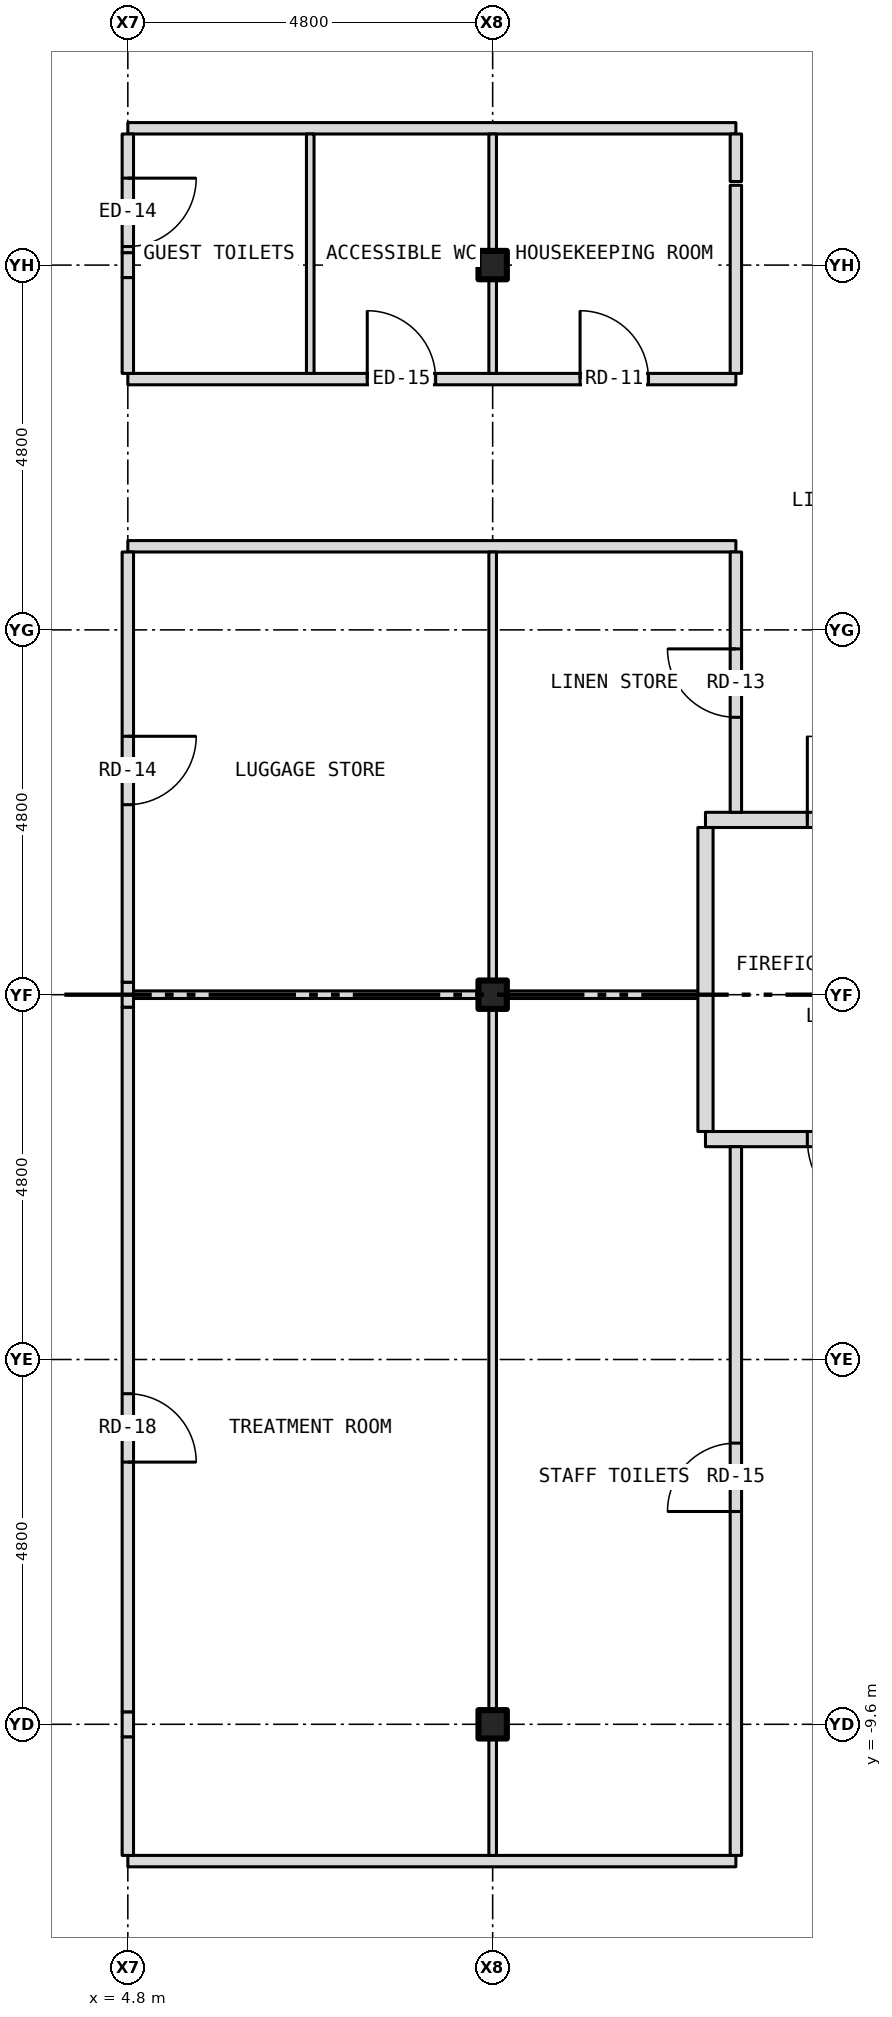
"""IFC4 building model, lengths in metres.
Left out: names, types, materials, properties, quantities, classifications, styles, units other than length and angle.
Written with IfcOpenShell. Run it as: python <this file> out.ifc"""

import sys

from ifc_helpers import new_model, si_unit, direction, frame, frame_2d, origin, origin_2d, place, context, subcontext, project, spatial, rectangle, i_section, extrude, element, fill, save


model = new_model("IFC4")
c1 = context("Model", 3, precision=1e-05, world=origin(), true_north=direction((0.0, 1.0)))
c2 = subcontext(c1, "Body", "Model", "MODEL_VIEW")
j1 = project(units=[si_unit("LENGTHUNIT", "METRE"), si_unit("PLANEANGLEUNIT", "RADIAN")], contexts=[c1])
p1 = place(None, origin())
s1 = spatial("IfcSite", under=j1, at=p1, CompositionType="ELEMENT")
p2 = place(p1, origin())
s2 = spatial("IfcBuilding", under=s1, at=p2, CompositionType="ELEMENT")
p3 = place(p2, frame((0.0, 0.0, 158.5)))
s3 = spatial("IfcBuildingStorey", under=s2, at=p3, CompositionType="ELEMENT", Elevation=158.5)
for number, where, z_axis, x_axis in (
    (1, (9.6, -9.6, -0.15), (0.0, 0.0, 1.0), (1.0, 0.0, 0.0)),
    (2, (9.6, 0.0, -0.15), (0.0, 0.0, 1.0), (1.0, 0.0, 0.0)),
    (3, (9.6, 9.6, -0.15), (0.0, 0.0, 1.0), (1.0, 0.0, 0.0)),
):
    element("IfcColumn", number, at=place(p3, frame(where, z_axis=z_axis, x_axis=x_axis)), inside=s3, PredefinedType="COLUMN", context=c2, shape_type="SweptSolid", body=[
        extrude(i_section(OverallWidth=0.373, OverallDepth=0.373, WebThickness=0.016, FlangeThickness=0.026, at=origin_2d()), origin(), (0.0, 0.0, 1.0), 3.5),
    ])
p4 = place(p3, frame((4.8, -11.4, 0.0), z_axis=(0.0, 0.0, 1.0), x_axis=(1.0, 0.0, 0.0)))
e4 = element("IfcWall", 4, at=p4, inside=s3, PredefinedType="PARTITIONING", context=c2, shape_type="SweptSolid", body=[
    extrude(rectangle(XDim=8.0, YDim=0.15, at=frame_2d((4.0, 0.0))), origin(), (0.0, 0.0, 1.0), 3.35),
])
p5 = place(p3, frame((12.4, -1.9, 0.0), z_axis=(0.0, 0.0, 1.0), x_axis=(1.0, 0.0, 0.0)))
e5 = element("IfcWall", 5, at=p5, inside=s3, PredefinedType="PARTITIONING", context=c2, shape_type="SweptSolid", body=[
    extrude(rectangle(XDim=3.28, YDim=0.2, at=frame_2d((1.64, 0.0))), origin(), (0.0, 0.0, 1.0), 3.35),
])
p6 = place(p5, frame((1.34, 0.0, 0.0)))
e6 = element("IfcOpeningElement", 6, at=p6, cuts=e5, PredefinedType="OPENING", context=c2, shape_type="SweptSolid", body=[
    extrude(rectangle(XDim=1.1, YDim=2.1, at=frame_2d((0.55, 1.05))), frame((0.0, 0.112, 0.0), z_axis=(0.0, -1.0, 0.0), x_axis=(1.0, 0.0, 0.0)), (0.0, 0.0, 1.0), 0.224),
])
p7 = place(p3, frame((4.8, 0.0, 0.0), z_axis=(0.0, 0.0, 1.0), x_axis=(1.0, 0.0, 0.0)))
e7 = element("IfcWall", 7, at=p7, inside=s3, PredefinedType="PARTITIONING", context=c2, shape_type="SweptSolid", body=[
    extrude(rectangle(XDim=4.613, YDim=0.1, at=frame_2d((2.307, 0.0))), origin(), (0.0, 0.0, 1.0), 2.728),
])
p8 = place(p3, frame((9.413, 0.0, 0.0), z_axis=(0.0, 0.0, 1.0), x_axis=(1.0, 0.0, 0.0)))
e8 = element("IfcWall", 8, at=p8, inside=s3, PredefinedType="PARTITIONING", context=c2, shape_type="SweptSolid", body=[
    extrude(rectangle(XDim=0.374, YDim=0.1, at=frame_2d((0.187, 0.0))), origin(), (0.0, 0.0, 1.0), 3.35),
])
p9 = place(p3, frame((9.787, 0.0, 0.0), z_axis=(0.0, 0.0, 1.0), x_axis=(1.0, 0.0, 0.0)))
e9 = element("IfcWall", 9, at=p9, inside=s3, PredefinedType="PARTITIONING", context=c2, shape_type="SweptSolid", body=[
    extrude(rectangle(XDim=2.613, YDim=0.1, at=frame_2d((1.306, 0.0))), origin(), (0.0, 0.0, 1.0), 2.728),
])
p10 = place(p3, frame((12.4, 2.3, 0.0), z_axis=(0.0, 0.0, 1.0), x_axis=(1.0, 0.0, 0.0)))
e10 = element("IfcWall", 10, at=p10, inside=s3, PredefinedType="PARTITIONING", context=c2, shape_type="SweptSolid", body=[
    extrude(rectangle(XDim=3.28, YDim=0.2, at=frame_2d((1.64, 0.0))), origin(), (0.0, 0.0, 1.0), 3.35),
])
p11 = place(p10, frame((1.34, 0.0, 0.0)))
e11 = element("IfcOpeningElement", 11, at=p11, cuts=e10, PredefinedType="OPENING", context=c2, shape_type="SweptSolid", body=[
    extrude(rectangle(XDim=1.1, YDim=2.1, at=frame_2d((0.55, 1.05))), frame((0.0, 0.112, 0.0), z_axis=(0.0, -1.0, 0.0), x_axis=(1.0, 0.0, 0.0)), (0.0, 0.0, 1.0), 0.224),
])
p12 = place(p3, frame((4.8, 5.9, 0.0), z_axis=(0.0, 0.0, 1.0), x_axis=(1.0, 0.0, 0.0)))
e12 = element("IfcWall", 12, at=p12, inside=s3, PredefinedType="PARTITIONING", context=c2, shape_type="SweptSolid", body=[
    extrude(rectangle(XDim=8.0, YDim=0.15, at=frame_2d((4.0, 0.0))), origin(), (0.0, 0.0, 1.0), 3.35),
])
p13 = place(p3, frame((4.8, 8.1, 0.0), z_axis=(0.0, 0.0, 1.0), x_axis=(1.0, 0.0, 0.0)))
e13 = element("IfcWall", 13, at=p13, inside=s3, PredefinedType="PARTITIONING", context=c2, shape_type="SweptSolid", body=[
    extrude(rectangle(XDim=8.0, YDim=0.15, at=frame_2d((4.0, 0.0))), origin(), (0.0, 0.0, 1.0), 3.35),
])
p14 = place(p13, frame((5.95, 0.0, 0.0)))
e14 = element("IfcOpeningElement", 14, at=p14, cuts=e13, PredefinedType="OPENING", context=c2, shape_type="SweptSolid", body=[
    extrude(rectangle(XDim=0.9, YDim=2.1, at=frame_2d((0.45, 1.05))), frame((0.0, 0.087, 0.0), z_axis=(0.0, -1.0, 0.0), x_axis=(1.0, 0.0, 0.0)), (0.0, 0.0, 1.0), 0.174),
])
p15 = place(p13, frame((3.15, 0.0, 0.0)))
e15 = element("IfcOpeningElement", 15, at=p15, cuts=e13, PredefinedType="OPENING", context=c2, shape_type="SweptSolid", body=[
    extrude(rectangle(XDim=0.9, YDim=2.1, at=frame_2d((0.45, 1.05))), frame((0.0, 0.087, 0.0), z_axis=(0.0, -1.0, 0.0), x_axis=(1.0, 0.0, 0.0)), (0.0, 0.0, 1.0), 0.174),
])
p16 = place(p3, frame((4.8, 11.4, 0.0), z_axis=(0.0, 0.0, 1.0), x_axis=(1.0, 0.0, 0.0)))
e16 = element("IfcWall", 16, at=p16, inside=s3, PredefinedType="PARTITIONING", context=c2, shape_type="SweptSolid", body=[
    extrude(rectangle(XDim=8.0, YDim=0.15, at=frame_2d((4.0, 0.0))), origin(), (0.0, 0.0, 1.0), 3.35),
])
p17 = place(p3, frame((4.8, -11.325, 0.0), z_axis=(0.0, 0.0, 1.0), x_axis=(0.0, 1.0, 0.0)))
e17 = element("IfcWall", 17, at=p17, inside=s3, PredefinedType="PARTITIONING", context=c2, shape_type="SweptSolid", body=[
    extrude(rectangle(XDim=1.561, YDim=0.15, at=frame_2d((0.781, 0.0))), origin(), (0.0, 0.0, 1.0), 2.817),
])
p18 = place(p3, frame((4.8, -9.764, 0.0), z_axis=(0.0, 0.0, 1.0), x_axis=(0.0, 1.0, 0.0)))
e18 = element("IfcWall", 18, at=p18, inside=s3, PredefinedType="PARTITIONING", context=c2, shape_type="SweptSolid", body=[
    extrude(rectangle(XDim=0.328, YDim=0.15, at=frame_2d((0.164, 0.0))), origin(), (0.0, 0.0, 1.0), 3.35),
])
p19 = place(p3, frame((4.8, -9.436, 0.0), z_axis=(0.0, 0.0, 1.0), x_axis=(0.0, 1.0, 0.0)))
e19 = element("IfcWall", 19, at=p19, inside=s3, PredefinedType="PARTITIONING", context=c2, shape_type="SweptSolid", body=[
    extrude(rectangle(XDim=9.272, YDim=0.15, at=frame_2d((4.636, 0.0))), origin(), (0.0, 0.0, 1.0), 2.817),
])
p20 = place(p19, frame((3.286, 0.0, 0.0)))
e20 = element("IfcOpeningElement", 20, at=p20, cuts=e19, PredefinedType="OPENING", context=c2, shape_type="SweptSolid", body=[
    extrude(rectangle(XDim=0.9, YDim=2.1, at=frame_2d((0.45, 1.05))), frame((0.0, 0.087, 0.0), z_axis=(0.0, -1.0, 0.0), x_axis=(1.0, 0.0, 0.0)), (0.0, 0.0, 1.0), 0.174),
])
p21 = place(p3, frame((4.8, -0.164, 0.0), z_axis=(0.0, 0.0, 1.0), x_axis=(0.0, 1.0, 0.0)))
e21 = element("IfcWall", 21, at=p21, inside=s3, PredefinedType="PARTITIONING", context=c2, shape_type="SweptSolid", body=[
    extrude(rectangle(XDim=0.328, YDim=0.15, at=frame_2d((0.164, 0.0))), origin(), (0.0, 0.0, 1.0), 3.35),
])
p22 = place(p3, frame((4.8, 0.164, 0.0), z_axis=(0.0, 0.0, 1.0), x_axis=(0.0, 1.0, 0.0)))
e22 = element("IfcWall", 22, at=p22, inside=s3, PredefinedType="PARTITIONING", context=c2, shape_type="SweptSolid", body=[
    extrude(rectangle(XDim=5.661, YDim=0.15, at=frame_2d((2.831, 0.0))), origin(), (0.0, 0.0, 1.0), 2.817),
])
p23 = place(p22, frame((2.336, 0.0, 0.0)))
e23 = element("IfcOpeningElement", 23, at=p23, cuts=e22, PredefinedType="OPENING", context=c2, shape_type="SweptSolid", body=[
    extrude(rectangle(XDim=0.9, YDim=2.1, at=frame_2d((0.45, 1.05))), frame((0.0, 0.087, 0.0), z_axis=(0.0, -1.0, 0.0), x_axis=(1.0, 0.0, 0.0)), (0.0, 0.0, 1.0), 0.174),
])
p24 = place(p3, frame((4.8, 8.175, 0.0), z_axis=(0.0, 0.0, 1.0), x_axis=(0.0, 1.0, 0.0)))
e24 = element("IfcWall", 24, at=p24, inside=s3, PredefinedType="PARTITIONING", context=c2, shape_type="SweptSolid", body=[
    extrude(rectangle(XDim=1.261, YDim=0.15, at=frame_2d((0.63, 0.0))), origin(), (0.0, 0.0, 1.0), 2.817),
])
p25 = place(p3, frame((4.8, 9.436, 0.0), z_axis=(0.0, 0.0, 1.0), x_axis=(0.0, 1.0, 0.0)))
e25 = element("IfcWall", 25, at=p25, inside=s3, PredefinedType="PARTITIONING", context=c2, shape_type="SweptSolid", body=[
    extrude(rectangle(XDim=0.328, YDim=0.15, at=frame_2d((0.164, 0.0))), origin(), (0.0, 0.0, 1.0), 3.35),
])
p26 = place(p3, frame((4.8, 9.764, 0.0), z_axis=(0.0, 0.0, 1.0), x_axis=(0.0, 1.0, 0.0)))
e26 = element("IfcWall", 26, at=p26, inside=s3, PredefinedType="PARTITIONING", context=c2, shape_type="SweptSolid", body=[
    extrude(rectangle(XDim=1.561, YDim=0.15, at=frame_2d((0.781, 0.0))), origin(), (0.0, 0.0, 1.0), 2.817),
])
p27 = place(p26, frame((0.08, 0.0, 0.0)))
e27 = element("IfcOpeningElement", 27, at=p27, cuts=e26, PredefinedType="OPENING", context=c2, shape_type="SweptSolid", body=[
    extrude(rectangle(XDim=0.9, YDim=2.1, at=frame_2d((0.45, 1.05))), frame((0.0, 0.087, 0.0), z_axis=(0.0, -1.0, 0.0), x_axis=(1.0, 0.0, 0.0)), (0.0, 0.0, 1.0), 0.174),
])
p28 = place(p3, frame((7.2, 8.175, 0.0), z_axis=(0.0, 0.0, 1.0), x_axis=(0.0, 1.0, 0.0)))
e28 = element("IfcWall", 28, at=p28, inside=s3, PredefinedType="PARTITIONING", context=c2, shape_type="SweptSolid", body=[
    extrude(rectangle(XDim=3.15, YDim=0.1, at=frame_2d((1.575, 0.0))), origin(), (0.0, 0.0, 1.0), 3.35),
])
p29 = place(p3, frame((9.6, -11.325, 0.0), z_axis=(0.0, 0.0, 1.0), x_axis=(0.0, 1.0, 0.0)))
e29 = element("IfcWall", 29, at=p29, inside=s3, PredefinedType="PARTITIONING", context=c2, shape_type="SweptSolid", body=[
    extrude(rectangle(XDim=1.538, YDim=0.1, at=frame_2d((0.769, 0.0))), origin(), (0.0, 0.0, 1.0), 2.728),
])
p30 = place(p3, frame((9.6, -9.787, 0.0), z_axis=(0.0, 0.0, 1.0), x_axis=(0.0, 1.0, 0.0)))
e30 = element("IfcWall", 30, at=p30, inside=s3, PredefinedType="PARTITIONING", context=c2, shape_type="SweptSolid", body=[
    extrude(rectangle(XDim=0.374, YDim=0.1, at=frame_2d((0.187, 0.0))), origin(), (0.0, 0.0, 1.0), 3.35),
])
p31 = place(p3, frame((9.6, -9.413, 0.0), z_axis=(0.0, 0.0, 1.0), x_axis=(0.0, 1.0, 0.0)))
e31 = element("IfcWall", 31, at=p31, inside=s3, PredefinedType="PARTITIONING", context=c2, shape_type="SweptSolid", body=[
    extrude(rectangle(XDim=9.363, YDim=0.1, at=frame_2d((4.682, 0.0))), origin(), (0.0, 0.0, 1.0), 2.728),
])
p32 = place(p3, frame((9.6, 0.05, 0.0), z_axis=(0.0, 0.0, 1.0), x_axis=(0.0, 1.0, 0.0)))
e32 = element("IfcWall", 32, at=p32, inside=s3, PredefinedType="PARTITIONING", context=c2, shape_type="SweptSolid", body=[
    extrude(rectangle(XDim=5.775, YDim=0.1, at=frame_2d((2.887, 0.0))), origin(), (0.0, 0.0, 1.0), 2.728),
])
p33 = place(p3, frame((9.6, 8.175, 0.0), z_axis=(0.0, 0.0, 1.0), x_axis=(0.0, 1.0, 0.0)))
e33 = element("IfcWall", 33, at=p33, inside=s3, PredefinedType="PARTITIONING", context=c2, shape_type="SweptSolid", body=[
    extrude(rectangle(XDim=1.238, YDim=0.1, at=frame_2d((0.619, 0.0))), origin(), (0.0, 0.0, 1.0), 2.728),
])
p34 = place(p3, frame((9.6, 9.413, 0.0), z_axis=(0.0, 0.0, 1.0), x_axis=(0.0, 1.0, 0.0)))
e34 = element("IfcWall", 34, at=p34, inside=s3, PredefinedType="PARTITIONING", context=c2, shape_type="SweptSolid", body=[
    extrude(rectangle(XDim=0.374, YDim=0.1, at=frame_2d((0.187, 0.0))), origin(), (0.0, 0.0, 1.0), 3.35),
])
p35 = place(p3, frame((9.6, 9.787, 0.0), z_axis=(0.0, 0.0, 1.0), x_axis=(0.0, 1.0, 0.0)))
e35 = element("IfcWall", 35, at=p35, inside=s3, PredefinedType="PARTITIONING", context=c2, shape_type="SweptSolid", body=[
    extrude(rectangle(XDim=1.538, YDim=0.1, at=frame_2d((0.769, 0.0))), origin(), (0.0, 0.0, 1.0), 2.728),
])
p36 = place(p3, frame((12.4, -1.8, 0.0), z_axis=(0.0, 0.0, 1.0), x_axis=(0.0, 1.0, 0.0)))
e36 = element("IfcWall", 36, at=p36, inside=s3, PredefinedType="PARTITIONING", context=c2, shape_type="SweptSolid", body=[
    extrude(rectangle(XDim=4.0, YDim=0.2, at=frame_2d((2.0, 0.0))), origin(), (0.0, 0.0, 1.0), 3.35),
])
p37 = place(p3, frame((12.8, -11.325, 0.0), z_axis=(0.0, 0.0, 1.0), x_axis=(0.0, 1.0, 0.0)))
e37 = element("IfcWall", 37, at=p37, inside=s3, PredefinedType="PARTITIONING", context=c2, shape_type="SweptSolid", body=[
    extrude(rectangle(XDim=9.325, YDim=0.15, at=frame_2d((4.663, 0.0))), origin(), (0.0, 0.0, 1.0), 3.35),
])
p38 = place(p37, frame((4.525, 0.0, 0.0)))
e38 = element("IfcOpeningElement", 38, at=p38, cuts=e37, PredefinedType="OPENING", context=c2, shape_type="SweptSolid", body=[
    extrude(rectangle(XDim=0.9, YDim=2.1, at=frame_2d((0.45, 1.05))), frame((0.0, 0.087, 0.0), z_axis=(0.0, -1.0, 0.0), x_axis=(1.0, 0.0, 0.0)), (0.0, 0.0, 1.0), 0.174),
])
p39 = place(p3, frame((12.8, 2.4, 0.0), z_axis=(0.0, 0.0, 1.0), x_axis=(0.0, 1.0, 0.0)))
e39 = element("IfcWall", 39, at=p39, inside=s3, PredefinedType="PARTITIONING", context=c2, shape_type="SweptSolid", body=[
    extrude(rectangle(XDim=3.425, YDim=0.15, at=frame_2d((1.712, 0.0))), origin(), (0.0, 0.0, 1.0), 3.35),
])
p40 = place(p39, frame((1.25, 0.0, 0.0)))
e40 = element("IfcOpeningElement", 40, at=p40, cuts=e39, PredefinedType="OPENING", context=c2, shape_type="SweptSolid", body=[
    extrude(rectangle(XDim=0.9, YDim=2.1, at=frame_2d((0.45, 1.05))), frame((0.0, 0.087, 0.0), z_axis=(0.0, -1.0, 0.0), x_axis=(1.0, 0.0, 0.0)), (0.0, 0.0, 1.0), 0.174),
])
p41 = place(p3, frame((12.8, 8.175, 0.0), z_axis=(0.0, 0.0, 1.0), x_axis=(0.0, 1.0, 0.0)))
e41 = element("IfcWall", 41, at=p41, inside=s3, PredefinedType="PARTITIONING", context=c2, shape_type="SweptSolid", body=[
    extrude(rectangle(XDim=2.475, YDim=0.15, at=frame_2d((1.237, 0.0))), origin(), (0.0, 0.0, 1.0), 3.35),
])
p42 = place(p3, frame((12.8, 10.7, 0.0), z_axis=(0.0, 0.0, 1.0), x_axis=(0.0, 1.0, 0.0)))
e42 = element("IfcWall", 42, at=p42, inside=s3, PredefinedType="PARTITIONING", context=c2, shape_type="SweptSolid", body=[
    extrude(rectangle(XDim=0.625, YDim=0.15, at=frame_2d((0.312, 0.0))), origin(), (0.0, 0.0, 1.0), 3.35),
])
p43 = place(p11, origin())
e43 = element("IfcDoor", 43, at=p43, inside=s3, OperationType="SINGLE_SWING_LEFT", PredefinedType="DOOR", context=c2, shape_type="SweptSolid", body=[
    extrude(rectangle(XDim=1.1, YDim=2.1, at=frame_2d((0.55, 1.05))), frame((0.0, 0.025, 0.0), z_axis=(0.0, -1.0, 0.0), x_axis=(1.0, 0.0, 0.0)), (0.0, 0.0, 1.0), 0.05),
])
fill(e11, e43)
p44 = place(p6, origin())
e44 = element("IfcDoor", 44, at=p44, inside=s3, OperationType="SINGLE_SWING_RIGHT", PredefinedType="DOOR", context=c2, shape_type="SweptSolid", body=[
    extrude(rectangle(XDim=1.1, YDim=2.1, at=frame_2d((0.55, 1.05))), frame((0.0, 0.025, 0.0), z_axis=(0.0, -1.0, 0.0), x_axis=(1.0, 0.0, 0.0)), (0.0, 0.0, 1.0), 0.05),
])
fill(e6, e44)
p45 = place(p14, origin())
e45 = element("IfcDoor", 45, at=p45, inside=s3, OperationType="SINGLE_SWING_LEFT", PredefinedType="DOOR", context=c2, shape_type="SweptSolid", body=[
    extrude(rectangle(XDim=0.9, YDim=2.1, at=frame_2d((0.45, 1.05))), frame((0.0, 0.025, 0.0), z_axis=(0.0, -1.0, 0.0), x_axis=(1.0, 0.0, 0.0)), (0.0, 0.0, 1.0), 0.05),
])
fill(e14, e45)
p46 = place(p27, origin())
e46 = element("IfcDoor", 46, at=p46, inside=s3, OperationType="SINGLE_SWING_RIGHT", PredefinedType="DOOR", context=c2, shape_type="SweptSolid", body=[
    extrude(rectangle(XDim=0.9, YDim=2.1, at=frame_2d((0.45, 1.05))), frame((0.0, 0.025, 0.0), z_axis=(0.0, -1.0, 0.0), x_axis=(1.0, 0.0, 0.0)), (0.0, 0.0, 1.0), 0.05),
])
fill(e27, e46)
p47 = place(p15, origin())
e47 = element("IfcDoor", 47, at=p47, inside=s3, OperationType="SINGLE_SWING_LEFT", PredefinedType="DOOR", context=c2, shape_type="SweptSolid", body=[
    extrude(rectangle(XDim=0.9, YDim=2.1, at=frame_2d((0.45, 1.05))), frame((0.0, 0.025, 0.0), z_axis=(0.0, -1.0, 0.0), x_axis=(1.0, 0.0, 0.0)), (0.0, 0.0, 1.0), 0.05),
])
fill(e15, e47)
p48 = place(p40, origin())
e48 = element("IfcDoor", 48, at=p48, inside=s3, OperationType="SINGLE_SWING_RIGHT", PredefinedType="DOOR", context=c2, shape_type="SweptSolid", body=[
    extrude(rectangle(XDim=0.9, YDim=2.1, at=frame_2d((0.45, 1.05))), frame((0.0, 0.025, 0.0), z_axis=(0.0, -1.0, 0.0), x_axis=(1.0, 0.0, 0.0)), (0.0, 0.0, 1.0), 0.05),
])
fill(e40, e48)
p49 = place(p23, origin())
e49 = element("IfcDoor", 49, at=p49, inside=s3, OperationType="SINGLE_SWING_RIGHT", PredefinedType="DOOR", context=c2, shape_type="SweptSolid", body=[
    extrude(rectangle(XDim=0.9, YDim=2.1, at=frame_2d((0.45, 1.05))), frame((0.0, 0.025, 0.0), z_axis=(0.0, -1.0, 0.0), x_axis=(1.0, 0.0, 0.0)), (0.0, 0.0, 1.0), 0.05),
])
fill(e23, e49)
p50 = place(p38, origin())
e50 = element("IfcDoor", 50, at=p50, inside=s3, OperationType="SINGLE_SWING_LEFT", PredefinedType="DOOR", context=c2, shape_type="SweptSolid", body=[
    extrude(rectangle(XDim=0.9, YDim=2.1, at=frame_2d((0.45, 1.05))), frame((0.0, 0.025, 0.0), z_axis=(0.0, -1.0, 0.0), x_axis=(1.0, 0.0, 0.0)), (0.0, 0.0, 1.0), 0.05),
])
fill(e38, e50)
p51 = place(p20, origin())
e51 = element("IfcDoor", 51, at=p51, inside=s3, OperationType="SINGLE_SWING_LEFT", PredefinedType="DOOR", context=c2, shape_type="SweptSolid", body=[
    extrude(rectangle(XDim=0.9, YDim=2.1, at=frame_2d((0.45, 1.05))), frame((0.0, 0.025, 0.0), z_axis=(0.0, -1.0, 0.0), x_axis=(1.0, 0.0, 0.0)), (0.0, 0.0, 1.0), 0.05),
])
fill(e20, e51)
save(model, sys.argv[1])
